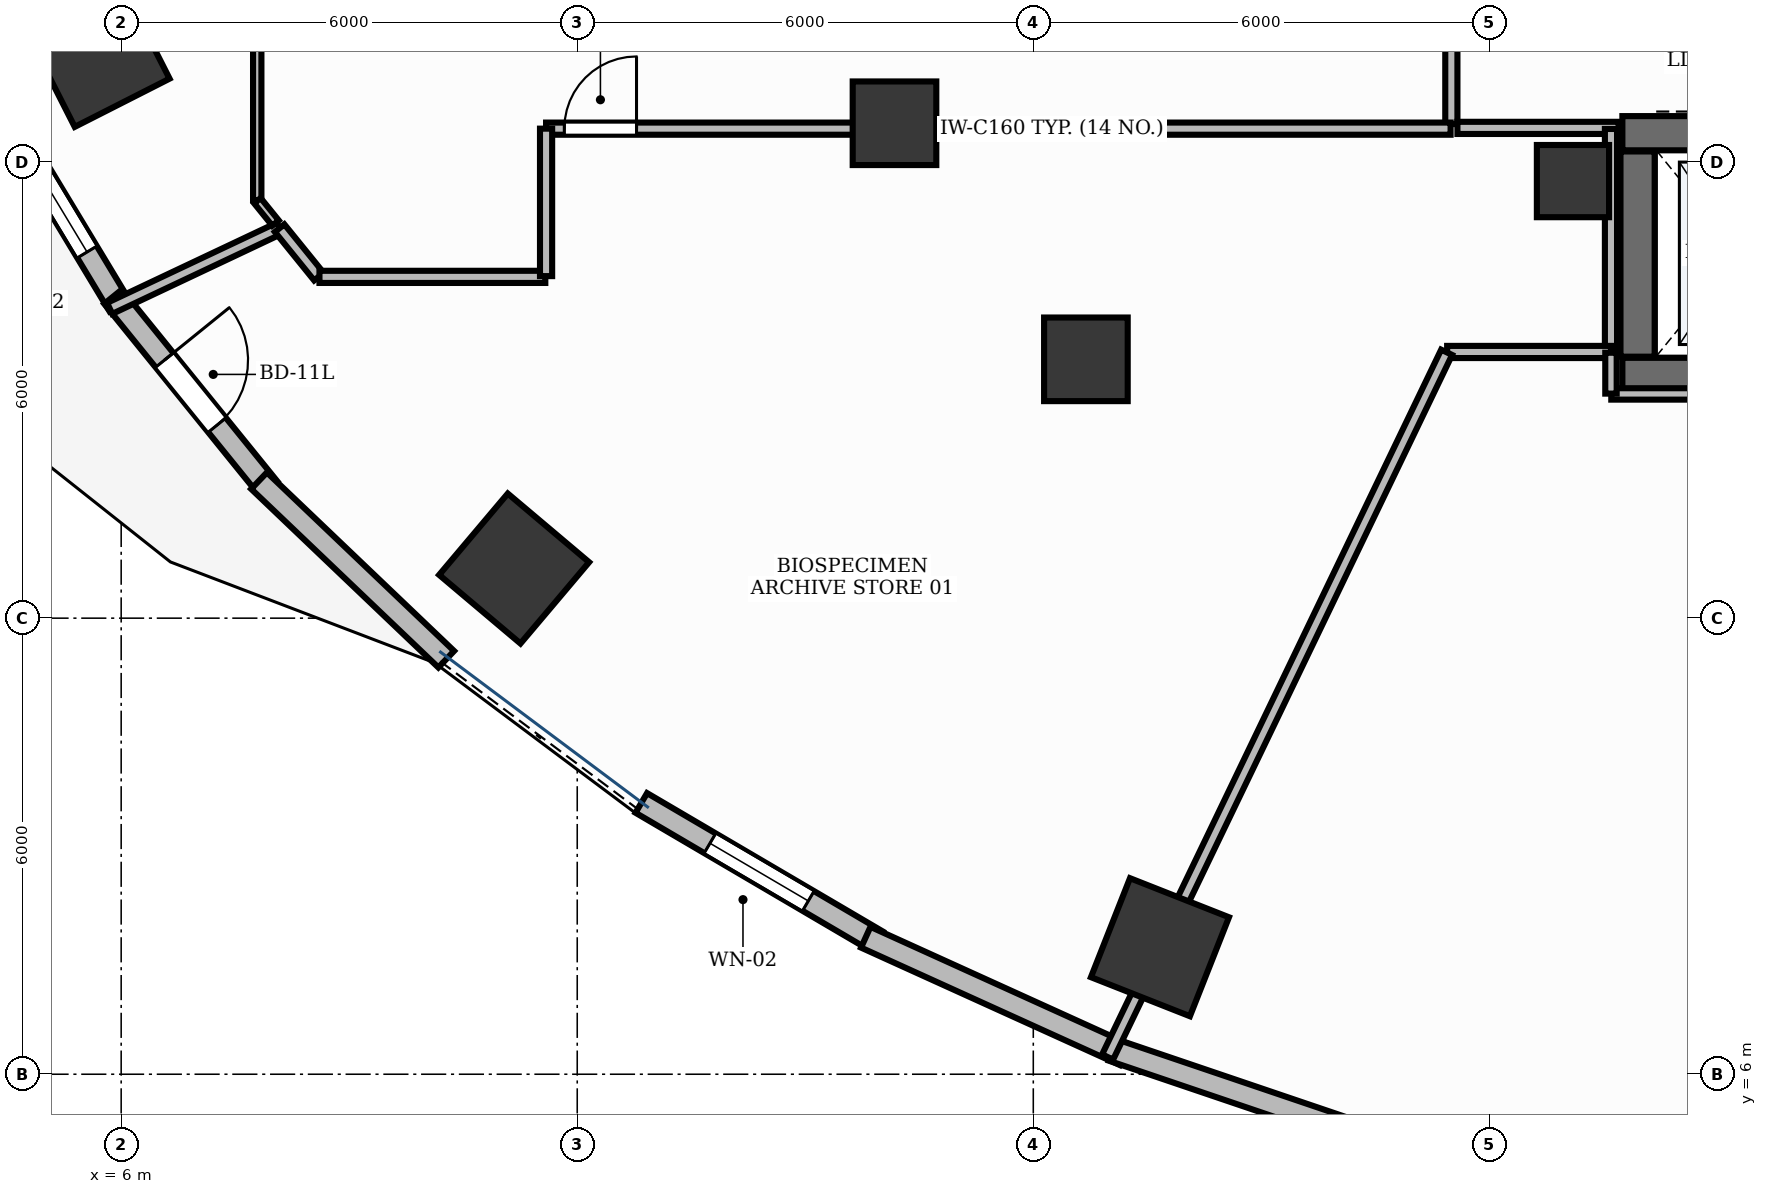
"""IFC4 building model, lengths in metres.
Left out: names, types, materials, properties, quantities, classifications, styles, units other than length and angle.
Written with IfcOpenShell. Run it as: python <this file> out.ifc"""

import sys

from ifc_helpers import new_model, si_unit, direction, frame, frame_2d, origin, origin_2d, place, context, subcontext, project, spatial, rectangle, extrude, element, fill, save


model = new_model("IFC4")
c1 = context("Model", 3, precision=1e-05, world=origin(), true_north=direction((0.0, 1.0)))
c2 = subcontext(c1, "Body", "Model", "MODEL_VIEW")
j1 = project(units=[si_unit("LENGTHUNIT", "METRE"), si_unit("PLANEANGLEUNIT", "RADIAN")], contexts=[c1])
p1 = place(None, origin())
s1 = spatial("IfcSite", under=j1, at=p1, CompositionType="ELEMENT")
p2 = place(p1, origin())
s2 = spatial("IfcBuilding", under=s1, at=p2, CompositionType="ELEMENT")
p3 = place(p2, frame((0.0, 0.0, 63.6)))
s3 = spatial("IfcBuildingStorey", under=s2, at=p3, CompositionType="ELEMENT", Elevation=63.6)
p4 = place(p3, frame((25.75, 15.2, 0.0), z_axis=(0.0, 0.0, 1.0), x_axis=(1.0, 0.0, 0.0)))
e1 = element("IfcWall", 1, at=p4, inside=s3, PredefinedType="SHEAR", context=c2, shape_type="SweptSolid", body=[
    extrude(rectangle(XDim=3.1, YDim=0.45, at=frame_2d((1.55, 0.0))), origin(), (0.0, 0.0, 1.0), 3.9),
])
p5 = place(p3, frame((25.75, 18.38, 0.0), z_axis=(0.0, 0.0, 1.0), x_axis=(1.0, 0.0, 0.0)))
e2 = element("IfcWall", 2, at=p5, inside=s3, PredefinedType="SHEAR", context=c2, shape_type="SweptSolid", body=[
    extrude(rectangle(XDim=3.1, YDim=0.45, at=frame_2d((1.55, 0.0))), origin(), (0.0, 0.0, 1.0), 3.9),
])
p6 = place(p5, frame((0.9, 0.0, 0.0)))
e3 = element("IfcOpeningElement", 3, at=p6, cuts=e2, PredefinedType="OPENING", context=c2, shape_type="SweptSolid", body=[
    extrude(rectangle(XDim=1.3, YDim=2.2, at=frame_2d((0.65, 1.1))), frame((0.0, 0.24, 0.0), z_axis=(0.0, -1.0, 0.0), x_axis=(1.0, 0.0, 0.0)), (0.0, 0.0, 1.0), 0.48),
])
p7 = place(p3, frame((25.95, 15.44, 0.0), z_axis=(0.0, 0.0, 1.0), x_axis=(0.0, 1.0, 0.0)))
e4 = element("IfcWall", 4, at=p7, inside=s3, PredefinedType="SHEAR", context=c2, shape_type="SweptSolid", body=[
    extrude(rectangle(XDim=2.7, YDim=0.45, at=frame_2d((1.35, 0.0))), origin(), (0.0, 0.0, 1.0), 3.9),
])
p8 = place(p3, frame((25.1, 17.75, -0.0), z_axis=(0.0, 0.0, 1.0), x_axis=(1.0, 0.0, 0.0)))
e5 = element("IfcColumn", 5, at=p8, inside=s3, PredefinedType="PILASTER", context=c2, shape_type="SweptSolid", body=[
    extrude(rectangle(XDim=0.95, YDim=0.95, at=origin_2d()), origin(), (0.0, 0.0, 1.0), 3.901),
])
p9 = place(p3, frame((5.696, 19.404, -0.0), z_axis=(0.0, 0.0, 1.0), x_axis=(-0.453057191132, 0.891481453292, 0.0)))
e6 = element("IfcColumn", 6, at=p9, inside=s3, PredefinedType="COLUMN", context=c2, shape_type="SweptSolid", body=[
    extrude(rectangle(XDim=1.4, YDim=1.4, at=origin_2d()), origin(), (0.0, 0.0, 1.0), 3.901),
])
p10 = place(p3, frame((16.174, 18.511, -0.0), z_axis=(0.0, 0.0, 1.0), x_axis=(1.0, 0.0, 0.0)))
e7 = element("IfcColumn", 7, at=p10, inside=s3, PredefinedType="COLUMN", context=c2, shape_type="SweptSolid", body=[
    extrude(rectangle(XDim=1.1, YDim=1.1, at=origin_2d()), origin(), (0.0, 0.0, 1.0), 3.901),
])
p11 = place(p3, frame((11.17, 12.653, -0.0), z_axis=(0.0, 0.0, 1.0), x_axis=(-0.764246456939, 0.644924300253, 0.0)))
e8 = element("IfcColumn", 8, at=p11, inside=s3, PredefinedType="COLUMN", context=c2, shape_type="SweptSolid", body=[
    extrude(rectangle(XDim=1.4, YDim=1.4, at=origin_2d()), origin(), (0.0, 0.0, 1.0), 3.901),
])
p12 = place(p3, frame((18.692, 15.405, -0.0), z_axis=(0.0, 0.0, 1.0), x_axis=(1.0, 0.0, 0.0)))
e9 = element("IfcColumn", 9, at=p12, inside=s3, PredefinedType="COLUMN", context=c2, shape_type="SweptSolid", body=[
    extrude(rectangle(XDim=1.1, YDim=1.1, at=origin_2d()), origin(), (0.0, 0.0, 1.0), 3.901),
])
p13 = place(p3, frame((19.667, 7.671, -0.0), z_axis=(0.0, 0.0, 1.0), x_axis=(-0.930225540858, 0.366988341962, 0.0)))
e10 = element("IfcColumn", 10, at=p13, inside=s3, PredefinedType="COLUMN", context=c2, shape_type="SweptSolid", body=[
    extrude(rectangle(XDim=1.4, YDim=1.4, at=origin_2d()), origin(), (0.0, 0.0, 1.0), 3.901),
])
p14 = place(p3, frame((4.352, 18.805, 0.0), z_axis=(0.0, 0.0, 1.0), x_axis=(0.516447962267, -0.856318575222, 0.0)))
e11 = element("IfcWall", 11, at=p14, inside=s3, PredefinedType="STANDARD", context=c2, shape_type="SweptSolid", body=[
    extrude(rectangle(XDim=3.143, YDim=0.3, at=frame_2d((1.571, 0.0))), origin(), (0.0, 0.0, 1.0), 3.9),
])
p15 = place(p14, frame((0.821, 0.0, 0.95)))
e12 = element("IfcOpeningElement", 12, at=p15, cuts=e11, PredefinedType="OPENING", context=c2, shape_type="SweptSolid", body=[
    extrude(rectangle(XDim=1.5, YDim=1.8, at=frame_2d((0.75, 0.9))), frame((0.0, 0.165, 0.0), z_axis=(0.0, -1.0, 0.0), x_axis=(1.0, 0.0, 0.0)), (0.0, 0.0, 1.0), 0.33),
])
p16 = place(p3, frame((5.894, 16.23, 0.0), z_axis=(0.0, 0.0, 1.0), x_axis=(0.629295540187, -0.777166084631, 0.0)))
e13 = element("IfcWall", 13, at=p16, inside=s3, PredefinedType="STANDARD", context=c2, shape_type="SweptSolid", body=[
    extrude(rectangle(XDim=3.248, YDim=0.3, at=frame_2d((1.624, 0.0))), origin(), (0.0, 0.0, 1.0), 3.9),
])
p17 = place(p16, frame((1.074, 0.0, 0.0)))
e14 = element("IfcOpeningElement", 14, at=p17, cuts=e13, PredefinedType="OPENING", context=c2, shape_type="SweptSolid", body=[
    extrude(rectangle(XDim=1.1, YDim=2.15, at=frame_2d((0.55, 1.075))), frame((0.0, 0.165, 0.0), z_axis=(0.0, -1.0, 0.0), x_axis=(1.0, 0.0, 0.0)), (0.0, 0.0, 1.0), 0.33),
])
p18 = place(p3, frame((12.843, 9.569, 0.0), z_axis=(0.0, 0.0, 1.0), x_axis=(0.862473134325, -0.506102847817, 0.0)))
e15 = element("IfcWall", 15, at=p18, inside=s3, PredefinedType="STANDARD", context=c2, shape_type="SweptSolid", body=[
    extrude(rectangle(XDim=3.595, YDim=0.3, at=frame_2d((1.798, 0.0))), origin(), (0.0, 0.0, 1.0), 3.9),
])
p19 = place(p18, frame((1.048, 0.0, 0.95)))
e16 = element("IfcOpeningElement", 16, at=p19, cuts=e15, PredefinedType="OPENING", context=c2, shape_type="SweptSolid", body=[
    extrude(rectangle(XDim=1.5, YDim=1.8, at=frame_2d((0.75, 0.9))), frame((0.0, 0.165, 0.0), z_axis=(0.0, -1.0, 0.0), x_axis=(1.0, 0.0, 0.0)), (0.0, 0.0, 1.0), 0.33),
])
p20 = place(p3, frame((7.814, 13.808, 0.0), z_axis=(0.0, 0.0, 1.0), x_axis=(0.72369587847, -0.69011902994, 0.0)))
e17 = element("IfcWall", 17, at=p20, inside=s3, PredefinedType="STANDARD", context=c2, shape_type="SweptSolid", body=[
    extrude(rectangle(XDim=3.403, YDim=0.3, at=frame_2d((1.701, 0.0))), origin(), (0.0, 0.0, 1.0), 3.9),
])
p21 = place(p3, frame((15.796, 7.802, 0.0), z_axis=(0.0, 0.0, 1.0), x_axis=(0.910623406862, -0.413237233166, 0.0)))
e18 = element("IfcWall", 18, at=p21, inside=s3, PredefinedType="STANDARD", context=c2, shape_type="SweptSolid", body=[
    extrude(rectangle(XDim=3.74, YDim=0.3, at=frame_2d((1.87, 0.0))), origin(), (0.0, 0.0, 1.0), 3.47),
])
p22 = place(p3, frame((19.04, 6.321, 0.0), z_axis=(0.0, 0.0, 1.0), x_axis=(0.94702579403, -0.321157508773, 0.0)))
e19 = element("IfcWall", 19, at=p22, inside=s3, PredefinedType="STANDARD", context=c2, shape_type="SweptSolid", body=[
    extrude(rectangle(XDim=3.83, YDim=0.3, at=frame_2d((1.915, 0.0))), origin(), (0.0, 0.0, 1.0), 3.9),
])
p23 = place(p3, frame((23.5, 18.5, 0.0), z_axis=(0.0, 0.0, 1.0), x_axis=(0.0, 1.0, 0.0)))
e20 = element("IfcWall", 20, at=p23, inside=s3, PredefinedType="PARTITIONING", context=c2, shape_type="SweptSolid", body=[
    extrude(rectangle(XDim=3.4, YDim=0.16, at=frame_2d((1.7, 0.0))), origin(), (0.0, 0.0, 1.0), 2.91),
])
p24 = place(p23, frame((1.175, 0.0, 0.0)))
e21 = element("IfcOpeningElement", 21, at=p24, cuts=e20, PredefinedType="OPENING", context=c2, shape_type="SweptSolid", body=[
    extrude(rectangle(XDim=1.05, YDim=2.15, at=frame_2d((0.525, 1.075))), frame((0.0, 0.095, 0.0), z_axis=(0.0, -1.0, 0.0), x_axis=(1.0, 0.0, 0.0)), (0.0, 0.0, 1.0), 0.19),
])
p25 = place(p3, frame((23.58, 18.45, 0.0), z_axis=(0.0, 0.0, 1.0), x_axis=(1.0, 0.0, 0.0)))
e22 = element("IfcWall", 22, at=p25, inside=s3, PredefinedType="PARTITIONING", context=c2, shape_type="SweptSolid", body=[
    extrude(rectangle(XDim=2.12, YDim=0.16, at=frame_2d((1.06, 0.0))), origin(), (0.0, 0.0, 1.0), 2.91),
])
p26 = place(p3, frame((11.59, 18.44, 0.0), z_axis=(0.0, 0.0, 1.0), x_axis=(1.0, 0.0, 0.0)))
e23 = element("IfcWall", 23, at=p26, inside=s3, PredefinedType="PARTITIONING", context=c2, shape_type="SweptSolid", body=[
    extrude(rectangle(XDim=11.9, YDim=0.16, at=frame_2d((5.95, 0.0))), origin(), (0.0, 0.0, 1.0), 2.91),
])
p27 = place(p26, frame((0.24, 0.0, 0.0)))
e24 = element("IfcOpeningElement", 24, at=p27, cuts=e23, PredefinedType="OPENING", context=c2, shape_type="SweptSolid", body=[
    extrude(rectangle(XDim=0.95, YDim=2.15, at=frame_2d((0.475, 1.075))), frame((0.0, 0.095, 0.0), z_axis=(0.0, -1.0, 0.0), x_axis=(1.0, 0.0, 0.0)), (0.0, 0.0, 1.0), 0.19),
])
p28 = place(p3, frame((7.79, 36.501, 0.0), z_axis=(0.0, 0.0, 1.0), x_axis=(0.0, -1.0, 0.0)))
e25 = element("IfcWall", 25, at=p28, inside=s3, PredefinedType="MOVABLE", context=c2, shape_type="SweptSolid", body=[
    extrude(rectangle(XDim=19.002, YDim=0.11, at=frame_2d((9.501, 0.0))), origin(), (0.0, 0.0, 1.0), 2.91),
])
p29 = place(p28, frame((6.956, 0.0, 0.0)))
e26 = element("IfcOpeningElement", 26, at=p29, cuts=e25, PredefinedType="OPENING", context=c2, shape_type="SweptSolid", body=[
    extrude(rectangle(XDim=0.95, YDim=2.15, at=frame_2d((0.475, 1.075))), frame((0.0, 0.07, 0.0), z_axis=(0.0, -1.0, 0.0), x_axis=(1.0, 0.0, 0.0)), (0.0, 0.0, 1.0), 0.14),
])
p30 = place(p3, frame((5.848, 16.076, 0.0), z_axis=(0.0, 0.0, 1.0), x_axis=(0.904251823465, 0.426999578173, 0.0)))
e27 = element("IfcWall", 27, at=p30, inside=s3, PredefinedType="PARTITIONING", context=c2, shape_type="SweptSolid", body=[
    extrude(rectangle(XDim=2.473, YDim=0.16, at=frame_2d((1.236, 0.0))), origin(), (0.0, 0.0, 1.0), 2.91),
])
p31 = place(p3, frame((8.084, 17.132, 0.0), z_axis=(0.0, 0.0, 1.0), x_axis=(0.629146883335, -0.77728643317, 0.0)))
e28 = element("IfcWall", 28, at=p31, inside=s3, PredefinedType="PARTITIONING", context=c2, shape_type="SweptSolid", body=[
    extrude(rectangle(XDim=0.821, YDim=0.16, at=frame_2d((0.41, 0.0))), origin(), (0.0, 0.0, 1.0), 2.91),
])
p32 = place(p3, frame((8.609, 16.49, 0.0), z_axis=(0.0, 0.0, 1.0), x_axis=(1.0, 0.0, 0.0)))
e29 = element("IfcWall", 29, at=p32, inside=s3, PredefinedType="PARTITIONING", context=c2, shape_type="SweptSolid", body=[
    extrude(rectangle(XDim=2.971, YDim=0.16, at=frame_2d((1.486, 0.0))), origin(), (0.0, 0.0, 1.0), 2.91),
])
p33 = place(p3, frame((11.59, 16.5, 0.0), z_axis=(0.0, 0.0, 1.0), x_axis=(0.0, 1.0, 0.0)))
e30 = element("IfcWall", 30, at=p33, inside=s3, PredefinedType="PARTITIONING", context=c2, shape_type="SweptSolid", body=[
    extrude(rectangle(XDim=1.94, YDim=0.16, at=frame_2d((0.97, 0.0))), origin(), (0.0, 0.0, 1.0), 2.91),
])
p34 = place(p3, frame((25.6, 18.436, 0.0), z_axis=(0.0, 0.0, 1.0), x_axis=(0.0, -1.0, 0.0)))
e31 = element("IfcWall", 31, at=p34, inside=s3, PredefinedType="PARTITIONING", context=c2, shape_type="SweptSolid", body=[
    extrude(rectangle(XDim=2.934, YDim=0.16, at=frame_2d((1.467, 0.0))), origin(), (0.0, 0.0, 1.0), 2.91),
])
p35 = place(p3, frame((25.6, 15.502, 0.0), z_axis=(0.0, 0.0, 1.0), x_axis=(-1.0, 0.0, 0.0)))
e32 = element("IfcWall", 32, at=p35, inside=s3, PredefinedType="PARTITIONING", context=c2, shape_type="SweptSolid", body=[
    extrude(rectangle(XDim=2.155, YDim=0.16, at=frame_2d((1.078, 0.0))), origin(), (0.0, 0.0, 1.0), 2.91),
])
p36 = place(p3, frame((23.438, 15.498, 0.0), z_axis=(0.0, 0.0, 1.0), x_axis=(-0.433521640822, -0.90114315563, 0.0)))
e33 = element("IfcWall", 33, at=p36, inside=s3, PredefinedType="PARTITIONING", context=c2, shape_type="SweptSolid", body=[
    extrude(rectangle(XDim=10.288, YDim=0.16, at=frame_2d((5.144, 0.0))), origin(), (0.0, 0.0, 1.0), 2.91),
])
p37 = place(p3, frame((25.604, 14.95, 0.0), z_axis=(0.0, 0.0, 1.0), x_axis=(1.0, 0.0, 0.0)))
e34 = element("IfcWall", 34, at=p37, inside=s3, PredefinedType="PARTITIONING", context=c2, shape_type="SweptSolid", body=[
    extrude(rectangle(XDim=3.392, YDim=0.15, at=frame_2d((1.696, 0.0))), origin(), (0.0, 0.0, 1.0), 2.91),
])
p38 = place(p3, frame((25.6, 15.492, 0.0), z_axis=(0.0, 0.0, 1.0), x_axis=(0.0, -1.0, 0.0)))
e35 = element("IfcWall", 35, at=p38, inside=s3, PredefinedType="PARTITIONING", context=c2, shape_type="SweptSolid", body=[
    extrude(rectangle(XDim=0.538, YDim=0.15, at=frame_2d((0.269, 0.0))), origin(), (0.0, 0.0, 1.0), 2.91),
])
p39 = place(p3, frame((7.792, 17.492, 0.0), z_axis=(0.0, 0.0, 1.0), x_axis=(0.629086970035, -0.77733492404, 0.0)))
e36 = element("IfcWall", 36, at=p39, inside=s3, PredefinedType="MOVABLE", context=c2, shape_type="SweptSolid", body=[
    extrude(rectangle(XDim=0.379, YDim=0.11, at=frame_2d((0.189, 0.0))), origin(), (0.0, 0.0, 1.0), 2.91),
])
p40 = place(p15, origin())
e37 = element("IfcWindow", 37, at=p40, inside=s3, PartitioningType="DOUBLE_PANEL_VERTICAL", PredefinedType="WINDOW", context=c2, shape_type="SweptSolid", body=[
    extrude(rectangle(XDim=1.5, YDim=1.8, at=frame_2d((0.75, 0.9))), frame((0.0, 0.03, 0.0), z_axis=(0.0, -1.0, 0.0), x_axis=(1.0, 0.0, 0.0)), (0.0, 0.0, 1.0), 0.06),
])
fill(e12, e37)
p41 = place(p17, origin())
e38 = element("IfcDoor", 38, at=p41, inside=s3, OperationType="SINGLE_SWING_LEFT", PredefinedType="DOOR", context=c2, shape_type="SweptSolid", body=[
    extrude(rectangle(XDim=1.1, YDim=2.15, at=frame_2d((0.55, 1.075))), frame((0.0, 0.025, 0.0), z_axis=(0.0, -1.0, 0.0), x_axis=(1.0, 0.0, 0.0)), (0.0, 0.0, 1.0), 0.05),
])
fill(e14, e38)
p42 = place(p19, origin())
e39 = element("IfcWindow", 39, at=p42, inside=s3, PartitioningType="DOUBLE_PANEL_VERTICAL", PredefinedType="WINDOW", context=c2, shape_type="SweptSolid", body=[
    extrude(rectangle(XDim=1.5, YDim=1.8, at=frame_2d((0.75, 0.9))), frame((0.0, 0.03, 0.0), z_axis=(0.0, -1.0, 0.0), x_axis=(1.0, 0.0, 0.0)), (0.0, 0.0, 1.0), 0.06),
])
fill(e16, e39)
p43 = place(p27, origin())
e40 = element("IfcDoor", 40, at=p43, inside=s3, OperationType="SINGLE_SWING_RIGHT", PredefinedType="DOOR", context=c2, shape_type="SweptSolid", body=[
    extrude(rectangle(XDim=0.95, YDim=2.15, at=frame_2d((0.475, 1.075))), frame((0.0, 0.025, 0.0), z_axis=(0.0, -1.0, 0.0), x_axis=(1.0, 0.0, 0.0)), (0.0, 0.0, 1.0), 0.05),
])
fill(e24, e40)
save(model, sys.argv[1])
